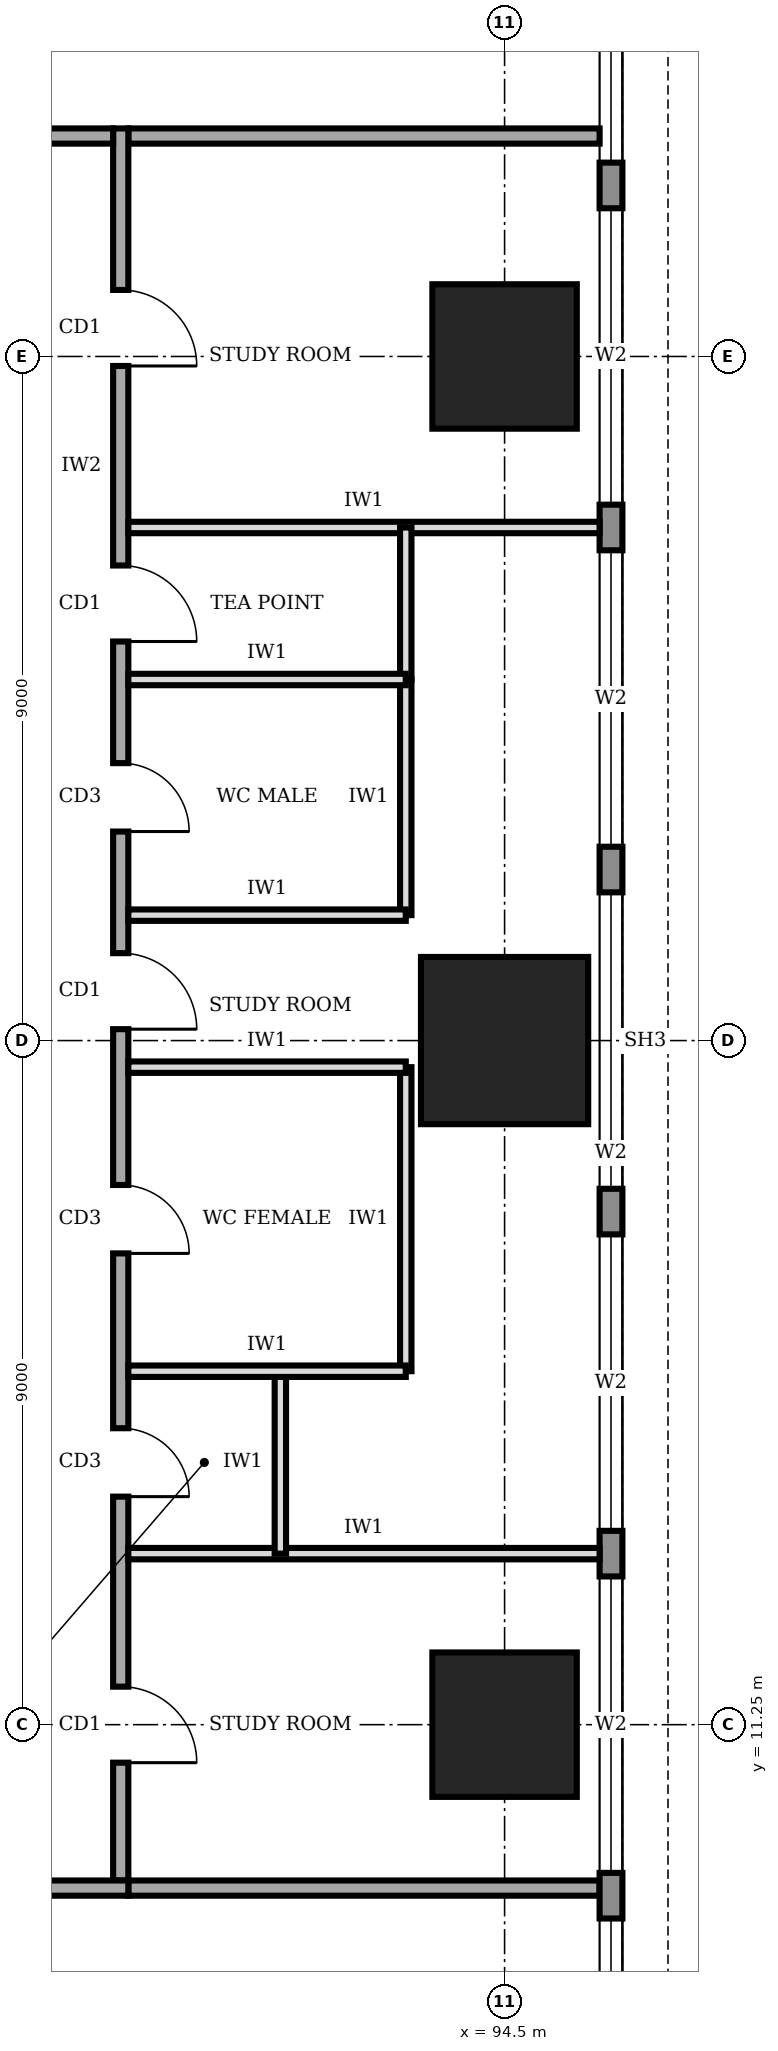
"""IFC4 building model, lengths in metres.
Left out: names, types, materials, properties, quantities, classifications, styles, units other than length and angle.
Written with IfcOpenShell. Run it as: python <this file> out.ifc"""

import sys

from ifc_helpers import new_model, si_unit, direction, frame, frame_2d, origin, origin_2d, place, context, subcontext, project, spatial, rectangle, extrude, element, fill, save


model = new_model("IFC4")
c1 = context("Model", 3, precision=1e-05, world=origin(), true_north=direction((0.0, 1.0)))
c2 = subcontext(c1, "Body", "Model", "MODEL_VIEW")
j1 = project(units=[si_unit("LENGTHUNIT", "METRE"), si_unit("PLANEANGLEUNIT", "RADIAN")], contexts=[c1])
p1 = place(None, origin())
s1 = spatial("IfcSite", under=j1, at=p1, CompositionType="ELEMENT")
p2 = place(p1, origin())
s2 = spatial("IfcBuilding", under=s1, at=p2, CompositionType="ELEMENT")
p3 = place(p2, frame((0.0, 0.0, 165.0)))
s3 = spatial("IfcBuildingStorey", under=s2, at=p3, CompositionType="ELEMENT", Elevation=165.0)
p4 = place(p3, frame((94.5, 11.25, 0.0), z_axis=(0.0, 0.0, 1.0), x_axis=(1.0, 0.0, 0.0)))
e1 = element("IfcColumn", 1, at=p4, inside=s3, PredefinedType="COLUMN", context=c2, shape_type="SweptSolid", body=[
    extrude(rectangle(XDim=1.9, YDim=1.9, at=origin_2d()), origin(), (0.0, 0.0, 1.0), 4.0),
])
p5 = place(p3, frame((94.5, 20.25, 0.0), z_axis=(0.0, 0.0, 1.0), x_axis=(1.0, 0.0, 0.0)))
e2 = element("IfcColumn", 2, at=p5, inside=s3, PredefinedType="COLUMN", context=c2, shape_type="SweptSolid", body=[
    extrude(rectangle(XDim=2.2, YDim=2.2, at=origin_2d()), origin(), (0.0, 0.0, 1.0), 4.0),
])
p6 = place(p3, frame((94.5, 29.25, 0.0), z_axis=(0.0, 0.0, 1.0), x_axis=(1.0, 0.0, 0.0)))
e3 = element("IfcColumn", 3, at=p6, inside=s3, PredefinedType="COLUMN", context=c2, shape_type="SweptSolid", body=[
    extrude(rectangle(XDim=1.9, YDim=1.9, at=origin_2d()), origin(), (0.0, 0.0, 1.0), 4.0),
])
p7 = place(p3, frame((95.9, 3.32, 0.0), z_axis=(0.0, 0.0, 1.0), x_axis=(0.0, 1.0, 0.0)))
e4 = element("IfcWall", 4, at=p7, inside=s3, PredefinedType="STANDARD", context=c2, shape_type="SweptSolid", body=[
    extrude(rectangle(XDim=33.86, YDim=0.3, at=frame_2d((16.93, 0.0))), origin(), (0.0, 0.0, 1.0), 3.75),
])
p8 = place(p7, frame((1.48, 0.0, 0.6)))
e5 = element("IfcOpeningElement", 5, at=p8, cuts=e4, PredefinedType="OPENING", context=c2, shape_type="SweptSolid", body=[
    extrude(rectangle(XDim=3.9, YDim=2.6, at=frame_2d((1.95, 1.3))), frame((0.0, 0.16, 0.0), z_axis=(0.0, -1.0, 0.0), x_axis=(1.0, 0.0, 0.0)), (0.0, 0.0, 1.0), 0.32),
])
p9 = place(p7, frame((5.98, 0.0, 0.6)))
e6 = element("IfcOpeningElement", 6, at=p9, cuts=e4, PredefinedType="OPENING", context=c2, shape_type="SweptSolid", body=[
    extrude(rectangle(XDim=3.9, YDim=2.6, at=frame_2d((1.95, 1.3))), frame((0.0, 0.16, 0.0), z_axis=(0.0, -1.0, 0.0), x_axis=(1.0, 0.0, 0.0)), (0.0, 0.0, 1.0), 0.32),
])
p10 = place(p7, frame((10.48, 0.0, 0.6)))
e7 = element("IfcOpeningElement", 7, at=p10, cuts=e4, PredefinedType="OPENING", context=c2, shape_type="SweptSolid", body=[
    extrude(rectangle(XDim=3.9, YDim=2.6, at=frame_2d((1.95, 1.3))), frame((0.0, 0.16, 0.0), z_axis=(0.0, -1.0, 0.0), x_axis=(1.0, 0.0, 0.0)), (0.0, 0.0, 1.0), 0.32),
])
p11 = place(p7, frame((14.98, 0.0, 0.6)))
e8 = element("IfcOpeningElement", 8, at=p11, cuts=e4, PredefinedType="OPENING", context=c2, shape_type="SweptSolid", body=[
    extrude(rectangle(XDim=3.9, YDim=2.6, at=frame_2d((1.95, 1.3))), frame((0.0, 0.16, 0.0), z_axis=(0.0, -1.0, 0.0), x_axis=(1.0, 0.0, 0.0)), (0.0, 0.0, 1.0), 0.32),
])
p12 = place(p7, frame((19.48, 0.0, 0.6)))
e9 = element("IfcOpeningElement", 9, at=p12, cuts=e4, PredefinedType="OPENING", context=c2, shape_type="SweptSolid", body=[
    extrude(rectangle(XDim=3.9, YDim=2.6, at=frame_2d((1.95, 1.3))), frame((0.0, 0.16, 0.0), z_axis=(0.0, -1.0, 0.0), x_axis=(1.0, 0.0, 0.0)), (0.0, 0.0, 1.0), 0.32),
])
p13 = place(p7, frame((23.98, 0.0, 0.6)))
e10 = element("IfcOpeningElement", 10, at=p13, cuts=e4, PredefinedType="OPENING", context=c2, shape_type="SweptSolid", body=[
    extrude(rectangle(XDim=3.9, YDim=2.6, at=frame_2d((1.95, 1.3))), frame((0.0, 0.16, 0.0), z_axis=(0.0, -1.0, 0.0), x_axis=(1.0, 0.0, 0.0)), (0.0, 0.0, 1.0), 0.32),
])
p14 = place(p7, frame((28.48, 0.0, 0.6)))
e11 = element("IfcOpeningElement", 11, at=p14, cuts=e4, PredefinedType="OPENING", context=c2, shape_type="SweptSolid", body=[
    extrude(rectangle(XDim=3.9, YDim=2.6, at=frame_2d((1.95, 1.3))), frame((0.0, 0.16, 0.0), z_axis=(0.0, -1.0, 0.0), x_axis=(1.0, 0.0, 0.0)), (0.0, 0.0, 1.0), 0.32),
])
p15 = place(p3, frame((63.3, 9.1, 0.0), z_axis=(0.0, 0.0, 1.0), x_axis=(1.0, 0.0, 0.0)))
e12 = element("IfcWall", 12, at=p15, inside=s3, PredefinedType="SOLIDWALL", context=c2, shape_type="SweptSolid", body=[
    extrude(rectangle(XDim=26.25, YDim=0.2, at=frame_2d((13.125, 0.0))), origin(), (0.0, 0.0, 1.0), 3.75),
])
p16 = place(p15, frame((12.425, 0.0, 0.0)))
e13 = element("IfcOpeningElement", 13, at=p16, cuts=e12, PredefinedType="OPENING", context=c2, shape_type="SweptSolid", body=[
    extrude(rectangle(XDim=1.4, YDim=2.1, at=frame_2d((0.7, 1.05))), frame((0.0, 0.11, 0.0), z_axis=(0.0, -1.0, 0.0), x_axis=(1.0, 0.0, 0.0)), (0.0, 0.0, 1.0), 0.22),
])
p17 = place(p3, frame((89.45, 9.2, 0.0), z_axis=(0.0, 0.0, 1.0), x_axis=(0.0, 1.0, 0.0)))
e14 = element("IfcWall", 14, at=p17, inside=s3, PredefinedType="SOLIDWALL", context=c2, shape_type="SweptSolid", body=[
    extrude(rectangle(XDim=23.05, YDim=0.2, at=frame_2d((11.525, 0.0))), origin(), (0.0, 0.0, 1.0), 3.75),
])
p18 = place(p17, frame((1.55, 0.0, 0.0)))
e15 = element("IfcOpeningElement", 15, at=p18, cuts=e14, PredefinedType="OPENING", context=c2, shape_type="SweptSolid", body=[
    extrude(rectangle(XDim=1.0, YDim=2.1, at=frame_2d((0.5, 1.05))), frame((0.0, 0.11, 0.0), z_axis=(0.0, -1.0, 0.0), x_axis=(1.0, 0.0, 0.0)), (0.0, 0.0, 1.0), 0.22),
])
p19 = place(p17, frame((5.05, 0.0, 0.0)))
e16 = element("IfcOpeningElement", 16, at=p19, cuts=e14, PredefinedType="OPENING", context=c2, shape_type="SweptSolid", body=[
    extrude(rectangle(XDim=0.9, YDim=2.1, at=frame_2d((0.45, 1.05))), frame((0.0, 0.11, 0.0), z_axis=(0.0, -1.0, 0.0), x_axis=(1.0, 0.0, 0.0)), (0.0, 0.0, 1.0), 0.22),
])
p20 = place(p17, frame((8.25, 0.0, 0.0)))
e17 = element("IfcOpeningElement", 17, at=p20, cuts=e14, PredefinedType="OPENING", context=c2, shape_type="SweptSolid", body=[
    extrude(rectangle(XDim=0.9, YDim=2.1, at=frame_2d((0.45, 1.05))), frame((0.0, 0.11, 0.0), z_axis=(0.0, -1.0, 0.0), x_axis=(1.0, 0.0, 0.0)), (0.0, 0.0, 1.0), 0.22),
])
p21 = place(p17, frame((13.8, 0.0, 0.0)))
e18 = element("IfcOpeningElement", 18, at=p21, cuts=e14, PredefinedType="OPENING", context=c2, shape_type="SweptSolid", body=[
    extrude(rectangle(XDim=0.9, YDim=2.1, at=frame_2d((0.45, 1.05))), frame((0.0, 0.11, 0.0), z_axis=(0.0, -1.0, 0.0), x_axis=(1.0, 0.0, 0.0)), (0.0, 0.0, 1.0), 0.22),
])
p22 = place(p17, frame((16.3, 0.0, 0.0)))
e19 = element("IfcOpeningElement", 19, at=p22, cuts=e14, PredefinedType="OPENING", context=c2, shape_type="SweptSolid", body=[
    extrude(rectangle(XDim=1.0, YDim=2.1, at=frame_2d((0.5, 1.05))), frame((0.0, 0.11, 0.0), z_axis=(0.0, -1.0, 0.0), x_axis=(1.0, 0.0, 0.0)), (0.0, 0.0, 1.0), 0.22),
])
p23 = place(p17, frame((11.2, 0.0, 0.0)))
e20 = element("IfcOpeningElement", 20, at=p23, cuts=e14, PredefinedType="OPENING", context=c2, shape_type="SweptSolid", body=[
    extrude(rectangle(XDim=1.0, YDim=2.1, at=frame_2d((0.5, 1.05))), frame((0.0, 0.11, 0.0), z_axis=(0.0, -1.0, 0.0), x_axis=(1.0, 0.0, 0.0)), (0.0, 0.0, 1.0), 0.22),
])
p24 = place(p17, frame((19.925, 0.0, 0.0)))
e21 = element("IfcOpeningElement", 21, at=p24, cuts=e14, PredefinedType="OPENING", context=c2, shape_type="SweptSolid", body=[
    extrude(rectangle(XDim=1.0, YDim=2.1, at=frame_2d((0.5, 1.05))), frame((0.0, 0.11, 0.0), z_axis=(0.0, -1.0, 0.0), x_axis=(1.0, 0.0, 0.0)), (0.0, 0.0, 1.0), 0.22),
])
p25 = place(p3, frame((89.35, 32.15, 0.0), z_axis=(0.0, 0.0, 1.0), x_axis=(-1.0, 0.0, 0.0)))
e22 = element("IfcWall", 22, at=p25, inside=s3, PredefinedType="SOLIDWALL", context=c2, shape_type="SweptSolid", body=[
    extrude(rectangle(XDim=26.05, YDim=0.2, at=frame_2d((13.025, 0.0))), origin(), (0.0, 0.0, 1.0), 3.75),
])
p26 = place(p25, frame((19.05, 0.0, 0.0)))
e23 = element("IfcOpeningElement", 23, at=p26, cuts=e22, PredefinedType="OPENING", context=c2, shape_type="SweptSolid", body=[
    extrude(rectangle(XDim=1.0, YDim=2.1, at=frame_2d((0.5, 1.05))), frame((0.0, 0.11, 0.0), z_axis=(0.0, -1.0, 0.0), x_axis=(1.0, 0.0, 0.0)), (0.0, 0.0, 1.0), 0.22),
])
p27 = place(p25, frame((10.1, 0.0, 0.0)))
e24 = element("IfcOpeningElement", 24, at=p27, cuts=e22, PredefinedType="OPENING", context=c2, shape_type="SweptSolid", body=[
    extrude(rectangle(XDim=1.0, YDim=2.1, at=frame_2d((0.5, 1.05))), frame((0.0, 0.11, 0.0), z_axis=(0.0, -1.0, 0.0), x_axis=(1.0, 0.0, 0.0)), (0.0, 0.0, 1.0), 0.22),
])
p28 = place(p25, frame((5.6, 0.0, 0.0)))
e25 = element("IfcOpeningElement", 25, at=p28, cuts=e22, PredefinedType="OPENING", context=c2, shape_type="SweptSolid", body=[
    extrude(rectangle(XDim=1.0, YDim=2.1, at=frame_2d((0.5, 1.05))), frame((0.0, 0.11, 0.0), z_axis=(0.0, -1.0, 0.0), x_axis=(1.0, 0.0, 0.0)), (0.0, 0.0, 1.0), 0.22),
])
p29 = place(p25, frame((1.325, 0.0, 0.0)))
e26 = element("IfcOpeningElement", 26, at=p29, cuts=e22, PredefinedType="OPENING", context=c2, shape_type="SweptSolid", body=[
    extrude(rectangle(XDim=1.0, YDim=2.1, at=frame_2d((0.5, 1.05))), frame((0.0, 0.11, 0.0), z_axis=(0.0, -1.0, 0.0), x_axis=(1.0, 0.0, 0.0)), (0.0, 0.0, 1.0), 0.22),
])
for number, where, z_axis, x_axis in (
    (27, (89.55, 9.1, 0.0), (0.0, 0.0, 1.0), (1.0, 0.0, 0.0)),
    (28, (89.55, 32.15, 0.0), (0.0, 0.0, 1.0), (1.0, 0.0, 0.0)),
):
    element("IfcWall", number, at=place(p3, frame(where, z_axis=z_axis, x_axis=x_axis)), inside=s3, PredefinedType="SOLIDWALL", context=c2, shape_type="SweptSolid", body=[
        extrude(rectangle(XDim=6.2, YDim=0.2, at=frame_2d((3.1, 0.0))), origin(), (0.0, 0.0, 1.0), 3.75),
    ])
for number, where, z_axis, x_axis in (
    (29, (89.55, 13.5, 0.0), (0.0, 0.0, 1.0), (1.0, 0.0, 0.0)),
    (30, (89.55, 27.0, 0.0), (0.0, 0.0, 1.0), (1.0, 0.0, 0.0)),
):
    element("IfcWall", number, at=place(p3, frame(where, z_axis=z_axis, x_axis=x_axis)), inside=s3, PredefinedType="PARTITIONING", context=c2, shape_type="SweptSolid", body=[
        extrude(rectangle(XDim=6.2, YDim=0.15, at=frame_2d((3.1, 0.0))), origin(), (0.0, 0.0, 1.0), 3.75),
    ])
for number, where, z_axis, x_axis in (
    (31, (89.55, 15.9, 0.0), (0.0, 0.0, 1.0), (1.0, 0.0, 0.0)),
    (32, (89.55, 19.9, 0.0), (0.0, 0.0, 1.0), (1.0, 0.0, 0.0)),
    (33, (89.55, 21.9, 0.0), (0.0, 0.0, 1.0), (1.0, 0.0, 0.0)),
    (34, (89.55, 25.0, 0.0), (0.0, 0.0, 1.0), (1.0, 0.0, 0.0)),
):
    element("IfcWall", number, at=place(p3, frame(where, z_axis=z_axis, x_axis=x_axis)), inside=s3, PredefinedType="PARTITIONING", context=c2, shape_type="SweptSolid", body=[
        extrude(rectangle(XDim=3.65, YDim=0.15, at=frame_2d((1.825, 0.0))), origin(), (0.0, 0.0, 1.0), 3.75),
    ])
p30 = place(p3, frame((91.55, 13.5, 0.0), z_axis=(0.0, 0.0, 1.0), x_axis=(0.0, 1.0, 0.0)))
e35 = element("IfcWall", 35, at=p30, inside=s3, PredefinedType="PARTITIONING", context=c2, shape_type="SweptSolid", body=[
    extrude(rectangle(XDim=2.4, YDim=0.15, at=frame_2d((1.2, 0.0))), origin(), (0.0, 0.0, 1.0), 3.75),
])
p31 = place(p3, frame((93.2, 15.9, 0.0), z_axis=(0.0, 0.0, 1.0), x_axis=(0.0, 1.0, 0.0)))
e36 = element("IfcWall", 36, at=p31, inside=s3, PredefinedType="PARTITIONING", context=c2, shape_type="SweptSolid", body=[
    extrude(rectangle(XDim=4.0, YDim=0.15, at=frame_2d((2.0, 0.0))), origin(), (0.0, 0.0, 1.0), 3.75),
])
p32 = place(p3, frame((93.2, 21.9, 0.0), z_axis=(0.0, 0.0, 1.0), x_axis=(0.0, 1.0, 0.0)))
e37 = element("IfcWall", 37, at=p32, inside=s3, PredefinedType="PARTITIONING", context=c2, shape_type="SweptSolid", body=[
    extrude(rectangle(XDim=3.1, YDim=0.15, at=frame_2d((1.55, 0.0))), origin(), (0.0, 0.0, 1.0), 3.75),
])
p33 = place(p3, frame((93.2, 25.0, 0.0), z_axis=(0.0, 0.0, 1.0), x_axis=(0.0, 1.0, 0.0)))
e38 = element("IfcWall", 38, at=p33, inside=s3, PredefinedType="PARTITIONING", context=c2, shape_type="SweptSolid", body=[
    extrude(rectangle(XDim=2.0, YDim=0.15, at=frame_2d((1.0, 0.0))), origin(), (0.0, 0.0, 1.0), 3.75),
])
p34 = place(p8, origin())
e39 = element("IfcWindow", 39, at=p34, inside=s3, PartitioningType="SINGLE_PANEL", PredefinedType="WINDOW", context=c2, shape_type="SweptSolid", body=[
    extrude(rectangle(XDim=3.9, YDim=2.6, at=frame_2d((1.95, 1.3))), frame((0.0, 0.03, 0.0), z_axis=(0.0, -1.0, 0.0), x_axis=(1.0, 0.0, 0.0)), (0.0, 0.0, 1.0), 0.06),
])
fill(e5, e39)
p35 = place(p9, origin())
e40 = element("IfcWindow", 40, at=p35, inside=s3, PartitioningType="SINGLE_PANEL", PredefinedType="WINDOW", context=c2, shape_type="SweptSolid", body=[
    extrude(rectangle(XDim=3.9, YDim=2.6, at=frame_2d((1.95, 1.3))), frame((0.0, 0.03, 0.0), z_axis=(0.0, -1.0, 0.0), x_axis=(1.0, 0.0, 0.0)), (0.0, 0.0, 1.0), 0.06),
])
fill(e6, e40)
p36 = place(p10, origin())
e41 = element("IfcWindow", 41, at=p36, inside=s3, PartitioningType="SINGLE_PANEL", PredefinedType="WINDOW", context=c2, shape_type="SweptSolid", body=[
    extrude(rectangle(XDim=3.9, YDim=2.6, at=frame_2d((1.95, 1.3))), frame((0.0, 0.03, 0.0), z_axis=(0.0, -1.0, 0.0), x_axis=(1.0, 0.0, 0.0)), (0.0, 0.0, 1.0), 0.06),
])
fill(e7, e41)
p37 = place(p11, origin())
e42 = element("IfcWindow", 42, at=p37, inside=s3, PartitioningType="SINGLE_PANEL", PredefinedType="WINDOW", context=c2, shape_type="SweptSolid", body=[
    extrude(rectangle(XDim=3.9, YDim=2.6, at=frame_2d((1.95, 1.3))), frame((0.0, 0.03, 0.0), z_axis=(0.0, -1.0, 0.0), x_axis=(1.0, 0.0, 0.0)), (0.0, 0.0, 1.0), 0.06),
])
fill(e8, e42)
p38 = place(p12, origin())
e43 = element("IfcWindow", 43, at=p38, inside=s3, PartitioningType="SINGLE_PANEL", PredefinedType="WINDOW", context=c2, shape_type="SweptSolid", body=[
    extrude(rectangle(XDim=3.9, YDim=2.6, at=frame_2d((1.95, 1.3))), frame((0.0, 0.03, 0.0), z_axis=(0.0, -1.0, 0.0), x_axis=(1.0, 0.0, 0.0)), (0.0, 0.0, 1.0), 0.06),
])
fill(e9, e43)
p39 = place(p13, origin())
e44 = element("IfcWindow", 44, at=p39, inside=s3, PartitioningType="SINGLE_PANEL", PredefinedType="WINDOW", context=c2, shape_type="SweptSolid", body=[
    extrude(rectangle(XDim=3.9, YDim=2.6, at=frame_2d((1.95, 1.3))), frame((0.0, 0.03, 0.0), z_axis=(0.0, -1.0, 0.0), x_axis=(1.0, 0.0, 0.0)), (0.0, 0.0, 1.0), 0.06),
])
fill(e10, e44)
p40 = place(p14, origin())
e45 = element("IfcWindow", 45, at=p40, inside=s3, PartitioningType="SINGLE_PANEL", PredefinedType="WINDOW", context=c2, shape_type="SweptSolid", body=[
    extrude(rectangle(XDim=3.9, YDim=2.6, at=frame_2d((1.95, 1.3))), frame((0.0, 0.03, 0.0), z_axis=(0.0, -1.0, 0.0), x_axis=(1.0, 0.0, 0.0)), (0.0, 0.0, 1.0), 0.06),
])
fill(e11, e45)
p41 = place(p18, frame((1.0, 0.0, 0.0), z_axis=(0.0, 0.0, 1.0), x_axis=(-1.0, 0.0, 0.0)))
e46 = element("IfcDoor", 46, at=p41, inside=s3, OperationType="SINGLE_SWING_RIGHT", PredefinedType="DOOR", context=c2, shape_type="SweptSolid", body=[
    extrude(rectangle(XDim=1.0, YDim=2.1, at=frame_2d((0.5, 1.05))), frame((0.0, 0.025, 0.0), z_axis=(0.0, -1.0, 0.0), x_axis=(1.0, 0.0, 0.0)), (0.0, 0.0, 1.0), 0.05),
])
fill(e15, e46)
p42 = place(p19, frame((0.9, 0.0, 0.0), z_axis=(0.0, 0.0, 1.0), x_axis=(-1.0, 0.0, 0.0)))
e47 = element("IfcDoor", 47, at=p42, inside=s3, OperationType="SINGLE_SWING_RIGHT", PredefinedType="DOOR", context=c2, shape_type="SweptSolid", body=[
    extrude(rectangle(XDim=0.9, YDim=2.1, at=frame_2d((0.45, 1.05))), frame((0.0, 0.025, 0.0), z_axis=(0.0, -1.0, 0.0), x_axis=(1.0, 0.0, 0.0)), (0.0, 0.0, 1.0), 0.05),
])
fill(e16, e47)
p43 = place(p20, frame((0.9, 0.0, 0.0), z_axis=(0.0, 0.0, 1.0), x_axis=(-1.0, 0.0, 0.0)))
e48 = element("IfcDoor", 48, at=p43, inside=s3, OperationType="SINGLE_SWING_RIGHT", PredefinedType="DOOR", context=c2, shape_type="SweptSolid", body=[
    extrude(rectangle(XDim=0.9, YDim=2.1, at=frame_2d((0.45, 1.05))), frame((0.0, 0.025, 0.0), z_axis=(0.0, -1.0, 0.0), x_axis=(1.0, 0.0, 0.0)), (0.0, 0.0, 1.0), 0.05),
])
fill(e17, e48)
p44 = place(p21, frame((0.9, 0.0, 0.0), z_axis=(0.0, 0.0, 1.0), x_axis=(-1.0, 0.0, 0.0)))
e49 = element("IfcDoor", 49, at=p44, inside=s3, OperationType="SINGLE_SWING_RIGHT", PredefinedType="DOOR", context=c2, shape_type="SweptSolid", body=[
    extrude(rectangle(XDim=0.9, YDim=2.1, at=frame_2d((0.45, 1.05))), frame((0.0, 0.025, 0.0), z_axis=(0.0, -1.0, 0.0), x_axis=(1.0, 0.0, 0.0)), (0.0, 0.0, 1.0), 0.05),
])
fill(e18, e49)
p45 = place(p22, frame((1.0, 0.0, 0.0), z_axis=(0.0, 0.0, 1.0), x_axis=(-1.0, 0.0, 0.0)))
e50 = element("IfcDoor", 50, at=p45, inside=s3, OperationType="SINGLE_SWING_RIGHT", PredefinedType="DOOR", context=c2, shape_type="SweptSolid", body=[
    extrude(rectangle(XDim=1.0, YDim=2.1, at=frame_2d((0.5, 1.05))), frame((0.0, 0.025, 0.0), z_axis=(0.0, -1.0, 0.0), x_axis=(1.0, 0.0, 0.0)), (0.0, 0.0, 1.0), 0.05),
])
fill(e19, e50)
p46 = place(p23, frame((1.0, 0.0, 0.0), z_axis=(0.0, 0.0, 1.0), x_axis=(-1.0, 0.0, 0.0)))
e51 = element("IfcDoor", 51, at=p46, inside=s3, OperationType="SINGLE_SWING_RIGHT", PredefinedType="DOOR", context=c2, shape_type="SweptSolid", body=[
    extrude(rectangle(XDim=1.0, YDim=2.1, at=frame_2d((0.5, 1.05))), frame((0.0, 0.025, 0.0), z_axis=(0.0, -1.0, 0.0), x_axis=(1.0, 0.0, 0.0)), (0.0, 0.0, 1.0), 0.05),
])
fill(e20, e51)
p47 = place(p24, frame((1.0, 0.0, 0.0), z_axis=(0.0, 0.0, 1.0), x_axis=(-1.0, 0.0, 0.0)))
e52 = element("IfcDoor", 52, at=p47, inside=s3, OperationType="SINGLE_SWING_RIGHT", PredefinedType="DOOR", context=c2, shape_type="SweptSolid", body=[
    extrude(rectangle(XDim=1.0, YDim=2.1, at=frame_2d((0.5, 1.05))), frame((0.0, 0.025, 0.0), z_axis=(0.0, -1.0, 0.0), x_axis=(1.0, 0.0, 0.0)), (0.0, 0.0, 1.0), 0.05),
])
fill(e21, e52)
save(model, sys.argv[1])
